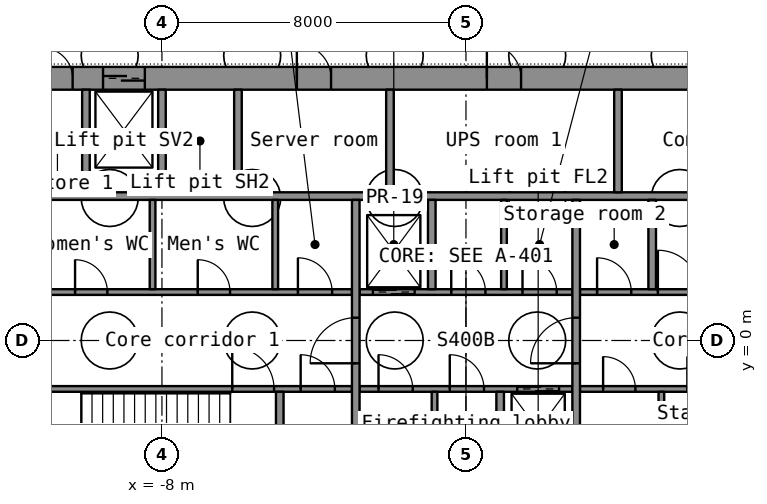
"""IFC4 building model, lengths in metres.
Left out: names, types, materials, properties, quantities, classifications, styles, units other than length and angle.
Written with IfcOpenShell. Run it as: python <this file> out.ifc"""

import sys

from ifc_helpers import new_model, si_unit, direction, frame, frame_2d, origin, place, context, subcontext, project, spatial, rectangle, extrude, element, fill, save


model = new_model("IFC4")
c1 = context("Model", 3, precision=1e-05, world=origin(), true_north=direction((0.0, 1.0)))
c2 = subcontext(c1, "Body", "Model", "MODEL_VIEW")
j1 = project(units=[si_unit("LENGTHUNIT", "METRE"), si_unit("PLANEANGLEUNIT", "RADIAN")], contexts=[c1])
p1 = place(None, origin())
s1 = spatial("IfcSite", under=j1, at=p1, CompositionType="ELEMENT")
p2 = place(p1, origin())
s2 = spatial("IfcBuilding", under=s1, at=p2, CompositionType="ELEMENT")
p3 = place(p2, frame((0.0, 0.0, -5.0)))
s3 = spatial("IfcBuildingStorey", under=s2, at=p3, CompositionType="ELEMENT", Elevation=-5.0)
p4 = place(p3, frame((-11.4, 6.9, 0.0), z_axis=(0.0, 0.0, 1.0), x_axis=(1.0, 0.0, 0.0)))
e1 = element("IfcWall", 1, at=p4, inside=s3, PredefinedType="SHEAR", context=c2, shape_type="SweptSolid", body=[
    extrude(rectangle(XDim=22.8, YDim=0.6, at=frame_2d((11.4, 0.0))), origin(), (0.0, 0.0, 1.0), 4.6),
])
p5 = place(p4, frame((1.85, 0.0, 0.0)))
e2 = element("IfcOpeningElement", 2, at=p5, cuts=e1, PredefinedType="OPENING", context=c2, shape_type="SweptSolid", body=[
    extrude(rectangle(XDim=1.1, YDim=2.2, at=frame_2d((0.55, 1.1))), frame((0.0, 0.31, 0.0), z_axis=(0.0, -1.0, 0.0), x_axis=(1.0, 0.0, 0.0)), (0.0, 0.0, 1.0), 0.62),
])
p6 = place(p4, frame((6.95, 0.0, 0.0)))
e3 = element("IfcOpeningElement", 3, at=p6, cuts=e1, PredefinedType="OPENING", context=c2, shape_type="SweptSolid", body=[
    extrude(rectangle(XDim=0.9, YDim=2.1, at=frame_2d((0.45, 1.05))), frame((0.0, 0.31, 0.0), z_axis=(0.0, -1.0, 0.0), x_axis=(1.0, 0.0, 0.0)), (0.0, 0.0, 1.0), 0.62),
])
p7 = place(p4, frame((11.95, 0.0, 0.0)))
e4 = element("IfcOpeningElement", 4, at=p7, cuts=e1, PredefinedType="OPENING", context=c2, shape_type="SweptSolid", body=[
    extrude(rectangle(XDim=0.9, YDim=2.1, at=frame_2d((0.45, 1.05))), frame((0.0, 0.31, 0.0), z_axis=(0.0, -1.0, 0.0), x_axis=(1.0, 0.0, 0.0)), (0.0, 0.0, 1.0), 0.62),
])
p8 = place(p4, frame((17.95, 0.0, 0.0)))
e5 = element("IfcOpeningElement", 5, at=p8, cuts=e1, PredefinedType="OPENING", context=c2, shape_type="SweptSolid", body=[
    extrude(rectangle(XDim=0.9, YDim=2.1, at=frame_2d((0.45, 1.05))), frame((0.0, 0.31, 0.0), z_axis=(0.0, -1.0, 0.0), x_axis=(1.0, 0.0, 0.0)), (0.0, 0.0, 1.0), 0.62),
])
p9 = place(p4, frame((0.25, 0.0, 0.0)))
e6 = element("IfcOpeningElement", 6, at=p9, cuts=e1, PredefinedType="OPENING", context=c2, shape_type="SweptSolid", body=[
    extrude(rectangle(XDim=0.8, YDim=2.05, at=frame_2d((0.4, 1.025))), frame((0.0, 0.31, 0.0), z_axis=(0.0, -1.0, 0.0), x_axis=(1.0, 0.0, 0.0)), (0.0, 0.0, 1.0), 0.62),
])
p10 = place(p4, frame((21.75, 0.0, 0.0)))
e7 = element("IfcOpeningElement", 7, at=p10, cuts=e1, PredefinedType="OPENING", context=c2, shape_type="SweptSolid", body=[
    extrude(rectangle(XDim=0.8, YDim=2.05, at=frame_2d((0.4, 1.025))), frame((0.0, 0.31, 0.0), z_axis=(0.0, -1.0, 0.0), x_axis=(1.0, 0.0, 0.0)), (0.0, 0.0, 1.0), 0.62),
])
p11 = place(p3, frame((-11.4, 3.8, 0.0), z_axis=(0.0, 0.0, 1.0), x_axis=(1.0, 0.0, 0.0)))
e8 = element("IfcWall", 8, at=p11, inside=s3, PredefinedType="SHEAR", context=c2, shape_type="SweptSolid", body=[
    extrude(rectangle(XDim=22.8, YDim=0.2, at=frame_2d((11.4, 0.0))), origin(), (0.0, 0.0, 1.0), 4.6),
])
for number, where, z_axis, x_axis in (
    (9, (-10.0, 3.9, 0.0), (0.0, 0.0, 1.0), (0.0, 1.0, 0.0)),
    (10, (-8.0, 3.9, 0.0), (0.0, 0.0, 1.0), (0.0, 1.0, 0.0)),
    (11, (-6.0, 3.9, 0.0), (0.0, 0.0, 1.0), (0.0, 1.0, 0.0)),
):
    element("IfcWall", number, at=place(p3, frame(where, z_axis=z_axis, x_axis=x_axis)), inside=s3, PredefinedType="SHEAR", context=c2, shape_type="SweptSolid", body=[
        extrude(rectangle(XDim=2.7, YDim=0.2, at=frame_2d((1.35, 0.0))), origin(), (0.0, 0.0, 1.0), 4.6),
    ])
for number, where, z_axis, x_axis in (
    (12, (-2.0, 3.9, 0.0), (0.0, 0.0, 1.0), (0.0, 1.0, 0.0)),
    (13, (4.0, 3.9, 0.0), (0.0, 0.0, 1.0), (0.0, 1.0, 0.0)),
):
    element("IfcWall", number, at=place(p3, frame(where, z_axis=z_axis, x_axis=x_axis)), inside=s3, PredefinedType="PARTITIONING", context=c2, shape_type="SweptSolid", body=[
        extrude(rectangle(XDim=2.7, YDim=0.2, at=frame_2d((1.35, 0.0))), origin(), (0.0, 0.0, 1.0), 4.6),
    ])
p12 = place(p3, frame((-11.4, -1.275, 0.0), z_axis=(0.0, 0.0, 1.0), x_axis=(1.0, 0.0, 0.0)))
e14 = element("IfcWall", 14, at=p12, inside=s3, PredefinedType="SHEAR", context=c2, shape_type="SweptSolid", body=[
    extrude(rectangle(XDim=8.4, YDim=0.15, at=frame_2d((4.2, 0.0))), origin(), (0.0, 0.0, 1.0), 4.6),
])
p13 = place(p12, frame((5.25, 0.0, 0.0)))
e15 = element("IfcOpeningElement", 15, at=p13, cuts=e14, PredefinedType="OPENING", context=c2, shape_type="SweptSolid", body=[
    extrude(rectangle(XDim=1.1, YDim=2.15, at=frame_2d((0.55, 1.075))), frame((0.0, 0.085, 0.0), z_axis=(0.0, -1.0, 0.0), x_axis=(1.0, 0.0, 0.0)), (0.0, 0.0, 1.0), 0.17),
])
p14 = place(p12, frame((7.05, 0.0, 0.0)))
e16 = element("IfcOpeningElement", 16, at=p14, cuts=e14, PredefinedType="OPENING", context=c2, shape_type="SweptSolid", body=[
    extrude(rectangle(XDim=0.9, YDim=2.1, at=frame_2d((0.45, 1.05))), frame((0.0, 0.085, 0.0), z_axis=(0.0, -1.0, 0.0), x_axis=(1.0, 0.0, 0.0)), (0.0, 0.0, 1.0), 0.17),
])
p15 = place(p3, frame((-2.8, -1.275, 0.0), z_axis=(0.0, 0.0, 1.0), x_axis=(1.0, 0.0, 0.0)))
e17 = element("IfcWall", 17, at=p15, inside=s3, PredefinedType="SHEAR", context=c2, shape_type="SweptSolid", body=[
    extrude(rectangle(XDim=5.6, YDim=0.15, at=frame_2d((2.8, 0.0))), origin(), (0.0, 0.0, 1.0), 4.6),
])
p16 = place(p15, frame((4.15, 0.0, 0.0)))
e18 = element("IfcOpeningElement", 18, at=p16, cuts=e17, PredefinedType="OPENING", context=c2, shape_type="SweptSolid", body=[
    extrude(rectangle(XDim=1.1, YDim=2.2, at=frame_2d((0.55, 1.1))), frame((0.0, 0.085, 0.0), z_axis=(0.0, -1.0, 0.0), x_axis=(1.0, 0.0, 0.0)), (0.0, 0.0, 1.0), 0.17),
])
p17 = place(p15, frame((0.499, 0.0, 0.0)))
e19 = element("IfcOpeningElement", 19, at=p17, cuts=e17, PredefinedType="OPENING", context=c2, shape_type="SweptSolid", body=[
    extrude(rectangle(XDim=0.9, YDim=2.1, at=frame_2d((0.45, 1.05))), frame((0.0, 0.085, 0.0), z_axis=(0.0, -1.0, 0.0), x_axis=(1.0, 0.0, 0.0)), (0.0, 0.0, 1.0), 0.17),
])
p18 = place(p15, frame((2.374, 0.0, 0.0)))
e20 = element("IfcOpeningElement", 20, at=p18, cuts=e17, PredefinedType="OPENING", context=c2, shape_type="SweptSolid", body=[
    extrude(rectangle(XDim=0.9, YDim=2.1, at=frame_2d((0.45, 1.05))), frame((0.0, 0.085, 0.0), z_axis=(0.0, -1.0, 0.0), x_axis=(1.0, 0.0, 0.0)), (0.0, 0.0, 1.0), 0.17),
])
p19 = place(p3, frame((3.0, -1.275, 0.0), z_axis=(0.0, 0.0, 1.0), x_axis=(1.0, 0.0, 0.0)))
e21 = element("IfcWall", 21, at=p19, inside=s3, PredefinedType="PARTITIONING", context=c2, shape_type="SweptSolid", body=[
    extrude(rectangle(XDim=8.4, YDim=0.15, at=frame_2d((4.2, 0.0))), origin(), (0.0, 0.0, 1.0), 4.6),
])
p20 = place(p19, frame((0.608, 0.0, 0.0)))
e22 = element("IfcOpeningElement", 22, at=p20, cuts=e21, PredefinedType="OPENING", context=c2, shape_type="SweptSolid", body=[
    extrude(rectangle(XDim=0.85, YDim=2.1, at=frame_2d((0.425, 1.05))), frame((0.0, 0.085, 0.0), z_axis=(0.0, -1.0, 0.0), x_axis=(1.0, 0.0, 0.0)), (0.0, 0.0, 1.0), 0.17),
])
p21 = place(p19, frame((2.825, 0.0, 0.0)))
e23 = element("IfcOpeningElement", 23, at=p21, cuts=e21, PredefinedType="OPENING", context=c2, shape_type="SweptSolid", body=[
    extrude(rectangle(XDim=0.85, YDim=2.1, at=frame_2d((0.425, 1.05))), frame((0.0, 0.085, 0.0), z_axis=(0.0, -1.0, 0.0), x_axis=(1.0, 0.0, 0.0)), (0.0, 0.0, 1.0), 0.17),
])
p22 = place(p19, frame((4.938, 0.0, 0.0)))
e24 = element("IfcOpeningElement", 24, at=p22, cuts=e21, PredefinedType="OPENING", context=c2, shape_type="SweptSolid", body=[
    extrude(rectangle(XDim=0.9, YDim=2.1, at=frame_2d((0.45, 1.05))), frame((0.0, 0.085, 0.0), z_axis=(0.0, -1.0, 0.0), x_axis=(1.0, 0.0, 0.0)), (0.0, 0.0, 1.0), 0.17),
])
p23 = place(p19, frame((6.996, 0.0, 0.0)))
e25 = element("IfcOpeningElement", 25, at=p23, cuts=e21, PredefinedType="OPENING", context=c2, shape_type="SweptSolid", body=[
    extrude(rectangle(XDim=0.9, YDim=2.1, at=frame_2d((0.45, 1.05))), frame((0.0, 0.085, 0.0), z_axis=(0.0, -1.0, 0.0), x_axis=(1.0, 0.0, 0.0)), (0.0, 0.0, 1.0), 0.17),
])
p24 = place(p3, frame((-11.4, 1.275, 0.0), z_axis=(0.0, 0.0, 1.0), x_axis=(1.0, 0.0, 0.0)))
e26 = element("IfcWall", 26, at=p24, inside=s3, PredefinedType="PARTITIONING", context=c2, shape_type="SweptSolid", body=[
    extrude(rectangle(XDim=8.4, YDim=0.15, at=frame_2d((4.2, 0.0))), origin(), (0.0, 0.0, 1.0), 4.6),
])
p25 = place(p24, frame((1.114, 0.0, 0.0)))
e27 = element("IfcOpeningElement", 27, at=p25, cuts=e26, PredefinedType="OPENING", context=c2, shape_type="SweptSolid", body=[
    extrude(rectangle(XDim=0.85, YDim=2.1, at=frame_2d((0.425, 1.05))), frame((0.0, 0.085, 0.0), z_axis=(0.0, -1.0, 0.0), x_axis=(1.0, 0.0, 0.0)), (0.0, 0.0, 1.0), 0.17),
])
p26 = place(p24, frame((4.342, 0.0, 0.0)))
e28 = element("IfcOpeningElement", 28, at=p26, cuts=e26, PredefinedType="OPENING", context=c2, shape_type="SweptSolid", body=[
    extrude(rectangle(XDim=0.85, YDim=2.1, at=frame_2d((0.425, 1.05))), frame((0.0, 0.085, 0.0), z_axis=(0.0, -1.0, 0.0), x_axis=(1.0, 0.0, 0.0)), (0.0, 0.0, 1.0), 0.17),
])
p27 = place(p24, frame((6.978, 0.0, 0.0)))
e29 = element("IfcOpeningElement", 29, at=p27, cuts=e26, PredefinedType="OPENING", context=c2, shape_type="SweptSolid", body=[
    extrude(rectangle(XDim=0.9, YDim=2.1, at=frame_2d((0.45, 1.05))), frame((0.0, 0.085, 0.0), z_axis=(0.0, -1.0, 0.0), x_axis=(1.0, 0.0, 0.0)), (0.0, 0.0, 1.0), 0.17),
])
p28 = place(p3, frame((-2.8, 1.275, 0.0), z_axis=(0.0, 0.0, 1.0), x_axis=(1.0, 0.0, 0.0)))
e30 = element("IfcWall", 30, at=p28, inside=s3, PredefinedType="SHEAR", context=c2, shape_type="SweptSolid", body=[
    extrude(rectangle(XDim=5.6, YDim=0.15, at=frame_2d((2.8, 0.0))), origin(), (0.0, 0.0, 1.0), 4.6),
])
p29 = place(p28, frame((0.35, 0.0, 0.0)))
e31 = element("IfcOpeningElement", 31, at=p29, cuts=e30, PredefinedType="OPENING", context=c2, shape_type="SweptSolid", body=[
    extrude(rectangle(XDim=1.1, YDim=2.2, at=frame_2d((0.55, 1.1))), frame((0.0, 0.085, 0.0), z_axis=(0.0, -1.0, 0.0), x_axis=(1.0, 0.0, 0.0)), (0.0, 0.0, 1.0), 0.17),
])
p30 = place(p28, frame((2.413, 0.0, 0.0)))
e32 = element("IfcOpeningElement", 32, at=p30, cuts=e30, PredefinedType="OPENING", context=c2, shape_type="SweptSolid", body=[
    extrude(rectangle(XDim=0.9, YDim=2.1, at=frame_2d((0.45, 1.05))), frame((0.0, 0.085, 0.0), z_axis=(0.0, -1.0, 0.0), x_axis=(1.0, 0.0, 0.0)), (0.0, 0.0, 1.0), 0.17),
])
p31 = place(p28, frame((4.288, 0.0, 0.0)))
e33 = element("IfcOpeningElement", 33, at=p31, cuts=e30, PredefinedType="OPENING", context=c2, shape_type="SweptSolid", body=[
    extrude(rectangle(XDim=0.9, YDim=2.1, at=frame_2d((0.45, 1.05))), frame((0.0, 0.085, 0.0), z_axis=(0.0, -1.0, 0.0), x_axis=(1.0, 0.0, 0.0)), (0.0, 0.0, 1.0), 0.17),
])
p32 = place(p3, frame((3.0, 1.275, 0.0), z_axis=(0.0, 0.0, 1.0), x_axis=(1.0, 0.0, 0.0)))
e34 = element("IfcWall", 34, at=p32, inside=s3, PredefinedType="SHEAR", context=c2, shape_type="SweptSolid", body=[
    extrude(rectangle(XDim=8.4, YDim=0.15, at=frame_2d((4.2, 0.0))), origin(), (0.0, 0.0, 1.0), 4.6),
])
p33 = place(p32, frame((2.05, 0.0, 0.0)))
e35 = element("IfcOpeningElement", 35, at=p33, cuts=e34, PredefinedType="OPENING", context=c2, shape_type="SweptSolid", body=[
    extrude(rectangle(XDim=1.1, YDim=2.15, at=frame_2d((0.55, 1.075))), frame((0.0, 0.085, 0.0), z_axis=(0.0, -1.0, 0.0), x_axis=(1.0, 0.0, 0.0)), (0.0, 0.0, 1.0), 0.17),
])
p34 = place(p32, frame((0.45, 0.0, 0.0)))
e36 = element("IfcOpeningElement", 36, at=p34, cuts=e34, PredefinedType="OPENING", context=c2, shape_type="SweptSolid", body=[
    extrude(rectangle(XDim=0.9, YDim=2.1, at=frame_2d((0.45, 1.05))), frame((0.0, 0.085, 0.0), z_axis=(0.0, -1.0, 0.0), x_axis=(1.0, 0.0, 0.0)), (0.0, 0.0, 1.0), 0.17),
])
p35 = place(p3, frame((-2.9, -3.7, 0.0), z_axis=(0.0, 0.0, 1.0), x_axis=(0.0, 1.0, 0.0)))
e37 = element("IfcWall", 37, at=p35, inside=s3, PredefinedType="SHEAR", context=c2, shape_type="SweptSolid", body=[
    extrude(rectangle(XDim=7.4, YDim=0.2, at=frame_2d((3.7, 0.0))), origin(), (0.0, 0.0, 1.0), 4.6),
])
p36 = place(p35, frame((3.1, 0.0, 0.0)))
e38 = element("IfcOpeningElement", 38, at=p36, cuts=e37, PredefinedType="OPENING", context=c2, shape_type="SweptSolid", body=[
    extrude(rectangle(XDim=1.2, YDim=2.2, at=frame_2d((0.6, 1.1))), frame((0.0, 0.11, 0.0), z_axis=(0.0, -1.0, 0.0), x_axis=(1.0, 0.0, 0.0)), (0.0, 0.0, 1.0), 0.22),
])
p37 = place(p3, frame((2.9, -3.7, 0.0), z_axis=(0.0, 0.0, 1.0), x_axis=(0.0, 1.0, 0.0)))
e39 = element("IfcWall", 39, at=p37, inside=s3, PredefinedType="SHEAR", context=c2, shape_type="SweptSolid", body=[
    extrude(rectangle(XDim=7.4, YDim=0.2, at=frame_2d((3.7, 0.0))), origin(), (0.0, 0.0, 1.0), 4.6),
])
p38 = place(p37, frame((3.1, 0.0, 0.0)))
e40 = element("IfcOpeningElement", 40, at=p38, cuts=e39, PredefinedType="OPENING", context=c2, shape_type="SweptSolid", body=[
    extrude(rectangle(XDim=1.2, YDim=2.2, at=frame_2d((0.6, 1.1))), frame((0.0, 0.11, 0.0), z_axis=(0.0, -1.0, 0.0), x_axis=(1.0, 0.0, 0.0)), (0.0, 0.0, 1.0), 0.22),
])
for number, where, z_axis, x_axis in (
    (41, (-0.9, 1.35, 0.0), (0.0, 0.0, 1.0), (0.0, 1.0, 0.0)),
    (42, (0.9, -3.7, 0.0), (0.0, 0.0, 1.0), (0.0, 1.0, 0.0)),
    (43, (-4.9, -3.7, 0.0), (0.0, 0.0, 1.0), (0.0, 1.0, 0.0)),
    (44, (4.9, 1.35, 0.0), (0.0, 0.0, 1.0), (0.0, 1.0, 0.0)),
):
    element("IfcWall", number, at=place(p3, frame(where, z_axis=z_axis, x_axis=x_axis)), inside=s3, PredefinedType="SHEAR", context=c2, shape_type="SweptSolid", body=[
        extrude(rectangle(XDim=2.35, YDim=0.2, at=frame_2d((1.175, 0.0))), origin(), (0.0, 0.0, 1.0), 4.6),
    ])
for number, where, z_axis, x_axis in (
    (45, (-8.247, 1.35, 0.0), (0.0, 0.0, 1.0), (0.0, 1.0, 0.0)),
    (46, (-5.019, 1.35, 0.0), (0.0, 0.0, 1.0), (0.0, 1.0, 0.0)),
    (47, (5.142, -3.7, 0.0), (0.0, 0.0, 1.0), (0.0, 1.0, 0.0)),
    (48, (1.0, 1.35, 0.0), (0.0, 0.0, 1.0), (0.0, 1.0, 0.0)),
    (49, (-0.827, -3.7, 0.0), (0.0, 0.0, 1.0), (0.0, 1.0, 0.0)),
):
    element("IfcWall", number, at=place(p3, frame(where, z_axis=z_axis, x_axis=x_axis)), inside=s3, PredefinedType="PARTITIONING", context=c2, shape_type="SweptSolid", body=[
        extrude(rectangle(XDim=2.35, YDim=0.15, at=frame_2d((1.175, 0.0))), origin(), (0.0, 0.0, 1.0), 4.6),
    ])
p39 = place(p5, origin())
e50 = element("IfcDoor", 50, at=p39, inside=s3, OperationType="DOUBLE_DOOR_SLIDING", PredefinedType="DOOR", context=c2, shape_type="SweptSolid", body=[
    extrude(rectangle(XDim=1.1, YDim=2.2, at=frame_2d((0.55, 1.1))), frame((0.0, 0.025, 0.0), z_axis=(0.0, -1.0, 0.0), x_axis=(1.0, 0.0, 0.0)), (0.0, 0.0, 1.0), 0.05),
])
fill(e2, e50)
p40 = place(p6, origin())
e51 = element("IfcDoor", 51, at=p40, inside=s3, OperationType="SINGLE_SWING_LEFT", PredefinedType="DOOR", context=c2, shape_type="SweptSolid", body=[
    extrude(rectangle(XDim=0.9, YDim=2.1, at=frame_2d((0.45, 1.05))), frame((0.0, 0.025, 0.0), z_axis=(0.0, -1.0, 0.0), x_axis=(1.0, 0.0, 0.0)), (0.0, 0.0, 1.0), 0.05),
])
fill(e3, e51)
p41 = place(p7, origin())
e52 = element("IfcDoor", 52, at=p41, inside=s3, OperationType="SINGLE_SWING_LEFT", PredefinedType="DOOR", context=c2, shape_type="SweptSolid", body=[
    extrude(rectangle(XDim=0.9, YDim=2.1, at=frame_2d((0.45, 1.05))), frame((0.0, 0.025, 0.0), z_axis=(0.0, -1.0, 0.0), x_axis=(1.0, 0.0, 0.0)), (0.0, 0.0, 1.0), 0.05),
])
fill(e4, e52)
p42 = place(p9, origin())
e53 = element("IfcDoor", 53, at=p42, inside=s3, OperationType="SINGLE_SWING_LEFT", PredefinedType="DOOR", context=c2, shape_type="SweptSolid", body=[
    extrude(rectangle(XDim=0.8, YDim=2.05, at=frame_2d((0.4, 1.025))), frame((0.0, 0.025, 0.0), z_axis=(0.0, -1.0, 0.0), x_axis=(1.0, 0.0, 0.0)), (0.0, 0.0, 1.0), 0.05),
])
fill(e6, e53)
p43 = place(p36, origin())
e54 = element("IfcDoor", 54, at=p43, inside=s3, OperationType="SINGLE_SWING_LEFT", PredefinedType="DOOR", context=c2, shape_type="SweptSolid", body=[
    extrude(rectangle(XDim=1.2, YDim=2.2, at=frame_2d((0.6, 1.1))), frame((0.0, 0.025, 0.0), z_axis=(0.0, -1.0, 0.0), x_axis=(1.0, 0.0, 0.0)), (0.0, 0.0, 1.0), 0.05),
])
fill(e38, e54)
p44 = place(p38, origin())
e55 = element("IfcDoor", 55, at=p44, inside=s3, OperationType="SINGLE_SWING_LEFT", PredefinedType="DOOR", context=c2, shape_type="SweptSolid", body=[
    extrude(rectangle(XDim=1.2, YDim=2.2, at=frame_2d((0.6, 1.1))), frame((0.0, 0.025, 0.0), z_axis=(0.0, -1.0, 0.0), x_axis=(1.0, 0.0, 0.0)), (0.0, 0.0, 1.0), 0.05),
])
fill(e40, e55)
p45 = place(p29, origin())
e56 = element("IfcDoor", 56, at=p45, inside=s3, OperationType="DOUBLE_DOOR_SLIDING", PredefinedType="DOOR", context=c2, shape_type="SweptSolid", body=[
    extrude(rectangle(XDim=1.1, YDim=2.2, at=frame_2d((0.55, 1.1))), frame((0.0, 0.025, 0.0), z_axis=(0.0, -1.0, 0.0), x_axis=(1.0, 0.0, 0.0)), (0.0, 0.0, 1.0), 0.05),
])
fill(e31, e56)
p46 = place(p16, origin())
e57 = element("IfcDoor", 57, at=p46, inside=s3, OperationType="DOUBLE_DOOR_SLIDING", PredefinedType="DOOR", context=c2, shape_type="SweptSolid", body=[
    extrude(rectangle(XDim=1.1, YDim=2.2, at=frame_2d((0.55, 1.1))), frame((0.0, 0.025, 0.0), z_axis=(0.0, -1.0, 0.0), x_axis=(1.0, 0.0, 0.0)), (0.0, 0.0, 1.0), 0.05),
])
fill(e18, e57)
p47 = place(p13, origin())
e58 = element("IfcDoor", 58, at=p47, inside=s3, OperationType="SINGLE_SWING_LEFT", PredefinedType="DOOR", context=c2, shape_type="SweptSolid", body=[
    extrude(rectangle(XDim=1.1, YDim=2.15, at=frame_2d((0.55, 1.075))), frame((0.0, 0.025, 0.0), z_axis=(0.0, -1.0, 0.0), x_axis=(1.0, 0.0, 0.0)), (0.0, 0.0, 1.0), 0.05),
])
fill(e15, e58)
p48 = place(p33, origin())
e59 = element("IfcDoor", 59, at=p48, inside=s3, OperationType="SINGLE_SWING_LEFT", PredefinedType="DOOR", context=c2, shape_type="SweptSolid", body=[
    extrude(rectangle(XDim=1.1, YDim=2.15, at=frame_2d((0.55, 1.075))), frame((0.0, 0.025, 0.0), z_axis=(0.0, -1.0, 0.0), x_axis=(1.0, 0.0, 0.0)), (0.0, 0.0, 1.0), 0.05),
])
fill(e35, e59)
p49 = place(p25, origin())
e60 = element("IfcDoor", 60, at=p49, inside=s3, OperationType="SINGLE_SWING_LEFT", PredefinedType="DOOR", context=c2, shape_type="SweptSolid", body=[
    extrude(rectangle(XDim=0.85, YDim=2.1, at=frame_2d((0.425, 1.05))), frame((0.0, 0.025, 0.0), z_axis=(0.0, -1.0, 0.0), x_axis=(1.0, 0.0, 0.0)), (0.0, 0.0, 1.0), 0.05),
])
fill(e27, e60)
p50 = place(p26, origin())
e61 = element("IfcDoor", 61, at=p50, inside=s3, OperationType="SINGLE_SWING_LEFT", PredefinedType="DOOR", context=c2, shape_type="SweptSolid", body=[
    extrude(rectangle(XDim=0.85, YDim=2.1, at=frame_2d((0.425, 1.05))), frame((0.0, 0.025, 0.0), z_axis=(0.0, -1.0, 0.0), x_axis=(1.0, 0.0, 0.0)), (0.0, 0.0, 1.0), 0.05),
])
fill(e28, e61)
p51 = place(p27, origin())
e62 = element("IfcDoor", 62, at=p51, inside=s3, OperationType="SINGLE_SWING_LEFT", PredefinedType="DOOR", context=c2, shape_type="SweptSolid", body=[
    extrude(rectangle(XDim=0.9, YDim=2.1, at=frame_2d((0.45, 1.05))), frame((0.0, 0.025, 0.0), z_axis=(0.0, -1.0, 0.0), x_axis=(1.0, 0.0, 0.0)), (0.0, 0.0, 1.0), 0.05),
])
fill(e29, e62)
p52 = place(p20, origin())
e63 = element("IfcDoor", 63, at=p52, inside=s3, OperationType="SINGLE_SWING_LEFT", PredefinedType="DOOR", context=c2, shape_type="SweptSolid", body=[
    extrude(rectangle(XDim=0.85, YDim=2.1, at=frame_2d((0.425, 1.05))), frame((0.0, 0.025, 0.0), z_axis=(0.0, -1.0, 0.0), x_axis=(1.0, 0.0, 0.0)), (0.0, 0.0, 1.0), 0.05),
])
fill(e22, e63)
p53 = place(p30, origin())
e64 = element("IfcDoor", 64, at=p53, inside=s3, OperationType="SINGLE_SWING_LEFT", PredefinedType="DOOR", context=c2, shape_type="SweptSolid", body=[
    extrude(rectangle(XDim=0.9, YDim=2.1, at=frame_2d((0.45, 1.05))), frame((0.0, 0.025, 0.0), z_axis=(0.0, -1.0, 0.0), x_axis=(1.0, 0.0, 0.0)), (0.0, 0.0, 1.0), 0.05),
])
fill(e32, e64)
p54 = place(p31, origin())
e65 = element("IfcDoor", 65, at=p54, inside=s3, OperationType="SINGLE_SWING_LEFT", PredefinedType="DOOR", context=c2, shape_type="SweptSolid", body=[
    extrude(rectangle(XDim=0.9, YDim=2.1, at=frame_2d((0.45, 1.05))), frame((0.0, 0.025, 0.0), z_axis=(0.0, -1.0, 0.0), x_axis=(1.0, 0.0, 0.0)), (0.0, 0.0, 1.0), 0.05),
])
fill(e33, e65)
p55 = place(p17, origin())
e66 = element("IfcDoor", 66, at=p55, inside=s3, OperationType="SINGLE_SWING_LEFT", PredefinedType="DOOR", context=c2, shape_type="SweptSolid", body=[
    extrude(rectangle(XDim=0.9, YDim=2.1, at=frame_2d((0.45, 1.05))), frame((0.0, 0.025, 0.0), z_axis=(0.0, -1.0, 0.0), x_axis=(1.0, 0.0, 0.0)), (0.0, 0.0, 1.0), 0.05),
])
fill(e19, e66)
p56 = place(p18, origin())
e67 = element("IfcDoor", 67, at=p56, inside=s3, OperationType="SINGLE_SWING_LEFT", PredefinedType="DOOR", context=c2, shape_type="SweptSolid", body=[
    extrude(rectangle(XDim=0.9, YDim=2.1, at=frame_2d((0.45, 1.05))), frame((0.0, 0.025, 0.0), z_axis=(0.0, -1.0, 0.0), x_axis=(1.0, 0.0, 0.0)), (0.0, 0.0, 1.0), 0.05),
])
fill(e20, e67)
p57 = place(p34, origin())
e68 = element("IfcDoor", 68, at=p57, inside=s3, OperationType="SINGLE_SWING_LEFT", PredefinedType="DOOR", context=c2, shape_type="SweptSolid", body=[
    extrude(rectangle(XDim=0.9, YDim=2.1, at=frame_2d((0.45, 1.05))), frame((0.0, 0.025, 0.0), z_axis=(0.0, -1.0, 0.0), x_axis=(1.0, 0.0, 0.0)), (0.0, 0.0, 1.0), 0.05),
])
fill(e36, e68)
p58 = place(p14, origin())
e69 = element("IfcDoor", 69, at=p58, inside=s3, OperationType="SINGLE_SWING_LEFT", PredefinedType="DOOR", context=c2, shape_type="SweptSolid", body=[
    extrude(rectangle(XDim=0.9, YDim=2.1, at=frame_2d((0.45, 1.05))), frame((0.0, 0.025, 0.0), z_axis=(0.0, -1.0, 0.0), x_axis=(1.0, 0.0, 0.0)), (0.0, 0.0, 1.0), 0.05),
])
fill(e16, e69)
save(model, sys.argv[1])
